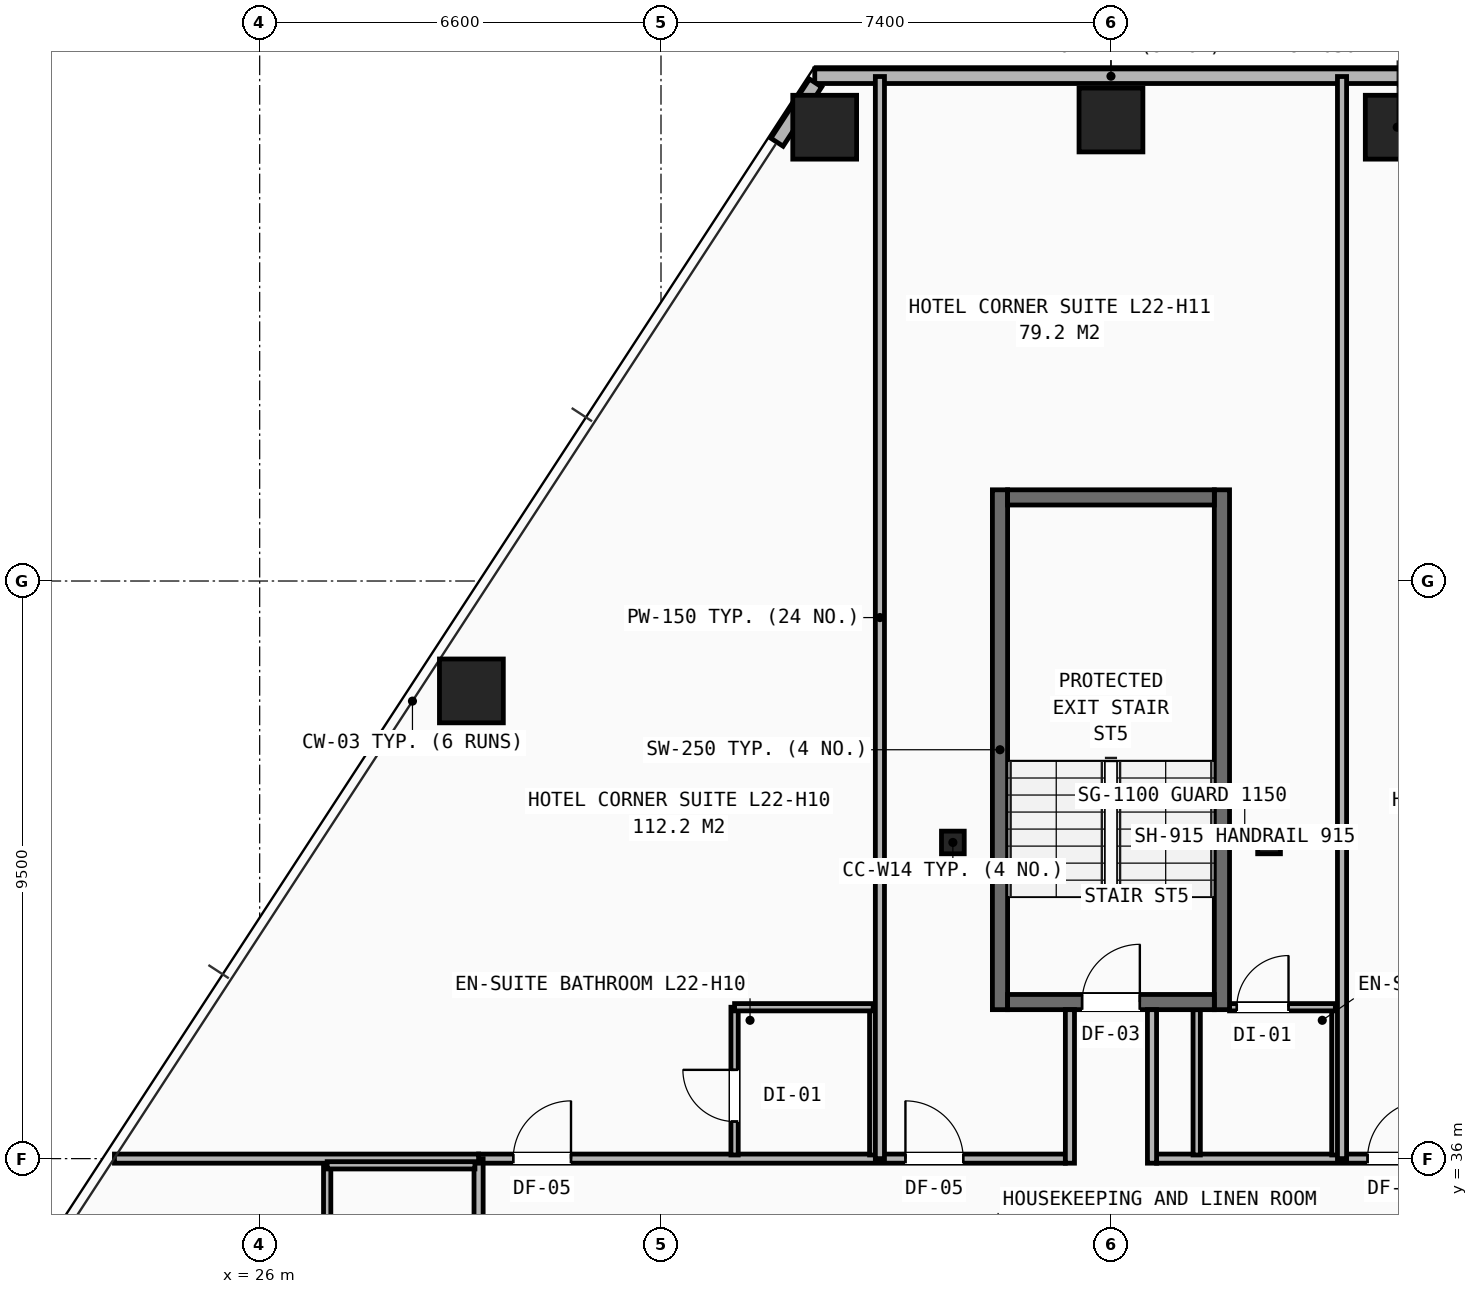
"""IFC4 building model, lengths in metres.
Left out: names, types, materials, properties, quantities, classifications, styles, units other than length and angle.
Written with IfcOpenShell. Run it as: python <this file> out.ifc"""

import sys

from ifc_helpers import new_model, si_unit, direction, frame, frame_2d, origin, origin_2d, place, context, subcontext, project, spatial, rectangle, hollow_rectangle, i_section, extrude, element, fill, save


model = new_model("IFC4")
c1 = context("Model", 3, precision=1e-05, world=origin(), true_north=direction((0.0, 1.0)))
c2 = subcontext(c1, "Body", "Model", "MODEL_VIEW")
j1 = project(units=[si_unit("LENGTHUNIT", "METRE"), si_unit("PLANEANGLEUNIT", "RADIAN")], contexts=[c1])
p1 = place(None, origin())
s1 = spatial("IfcSite", under=j1, at=p1, CompositionType="ELEMENT")
p2 = place(p1, origin())
s2 = spatial("IfcBuilding", under=s1, at=p2, CompositionType="ELEMENT")
p3 = place(p2, frame((0.0, 0.0, 79.8)))
s3 = spatial("IfcBuildingStorey", under=s2, at=p3, CompositionType="ELEMENT", Elevation=79.8)
for number, where, z_axis, x_axis in (
    (1, (37.4, 41.2, 0.0), (0.0, 0.0, 1.0), (1.0, 0.0, 0.0)),
    (2, (42.6, 41.2, 0.0), (0.0, 0.0, 1.0), (1.0, 0.0, 0.0)),
):
    element("IfcColumn", number, at=place(p3, frame(where, z_axis=z_axis, x_axis=x_axis)), inside=s3, PredefinedType="COLUMN", context=c2, shape_type="SweptSolid", body=[
        extrude(i_section(OverallWidth=0.374, OverallDepth=0.372, WebThickness=0.016, FlangeThickness=0.026, at=origin_2d()), origin(), (0.0, 0.0, 1.0), 3.2),
    ])
for number, where, z_axis, x_axis in (
    (3, (44.708, 52.964, 0.0), (0.0, 0.0, 1.0), (1.0, 0.0, 0.0)),
    (4, (40.0, 53.083, 0.0), (0.0, 0.0, 1.0), (1.0, 0.0, 0.0)),
    (5, (35.292, 52.964, 0.0), (0.0, 0.0, 1.0), (1.0, 0.0, 0.0)),
    (6, (29.482, 43.692, 0.0), (0.0, 0.0, 1.0), (1.0, 0.0, 0.0)),
):
    element("IfcColumn", number, at=place(p3, frame(where, z_axis=z_axis, x_axis=x_axis)), inside=s3, PredefinedType="COLUMN", context=c2, shape_type="SweptSolid", body=[
        extrude(hollow_rectangle(XDim=1.05, YDim=1.05, WallThickness=0.07, at=origin_2d()), origin(), (0.0, 0.0, 1.0), 3.2),
    ])
p4 = place(p3, frame((35.128, 53.802, 0.0), z_axis=(0.0, 0.0, 1.0), x_axis=(1.0, 0.0, 0.0)))
e7 = element("IfcWall", 7, at=p4, inside=s3, PredefinedType="SHEAR", context=c2, shape_type="SweptSolid", body=[
    extrude(rectangle(XDim=9.743, YDim=0.24, at=frame_2d((4.872, 0.0))), origin(), (0.0, 0.0, 1.0), 2.253),
])
p5 = place(p3, frame((35.142, 53.691, 0.0), z_axis=(0.0, 0.0, 1.0), x_axis=(-0.546287000619, -0.837598061695, 0.0)))
e8 = element("IfcWall", 8, at=p5, inside=s3, PredefinedType="SHEAR", context=c2, shape_type="SweptSolid", body=[
    extrude(rectangle(XDim=1.162, YDim=0.24, at=frame_2d((0.581, 0.0))), origin(), (0.0, 0.0, 1.0), 2.253),
])
p6 = place(p3, frame((29.6, 36.0, 0.0), z_axis=(0.0, 0.0, 1.0), x_axis=(1.0, 0.0, 0.0)))
e9 = element("IfcWall", 9, at=p6, inside=s3, PredefinedType="PARTITIONING", context=c2, shape_type="SweptSolid", body=[
    extrude(rectangle(XDim=9.65, YDim=0.15, at=frame_2d((4.825, 0.0))), origin(), (0.0, 0.0, 1.0), 2.97),
])
p7 = place(p6, frame((0.57, 0.0, 0.0)))
e10 = element("IfcOpeningElement", 10, at=p7, cuts=e9, PredefinedType="OPENING", context=c2, shape_type="SweptSolid", body=[
    extrude(rectangle(XDim=0.95, YDim=2.1, at=frame_2d((0.475, 1.05))), frame((0.0, 0.085, 0.0), z_axis=(0.0, -1.0, 0.0), x_axis=(1.0, 0.0, 0.0)), (0.0, 0.0, 1.0), 0.17),
])
p8 = place(p6, frame((7.02, 0.0, 0.0)))
e11 = element("IfcOpeningElement", 11, at=p8, cuts=e9, PredefinedType="OPENING", context=c2, shape_type="SweptSolid", body=[
    extrude(rectangle(XDim=0.95, YDim=2.1, at=frame_2d((0.475, 1.05))), frame((0.0, 0.085, 0.0), z_axis=(0.0, -1.0, 0.0), x_axis=(1.0, 0.0, 0.0)), (0.0, 0.0, 1.0), 0.17),
])
p9 = place(p3, frame((40.75, 36.0, 0.0), z_axis=(0.0, 0.0, 1.0), x_axis=(1.0, 0.0, 0.0)))
e12 = element("IfcWall", 12, at=p9, inside=s3, PredefinedType="PARTITIONING", context=c2, shape_type="SweptSolid", body=[
    extrude(rectangle(XDim=9.65, YDim=0.15, at=frame_2d((4.825, 0.0))), origin(), (0.0, 0.0, 1.0), 2.503),
])
p10 = place(p9, frame((3.47, 0.0, 0.0)))
e13 = element("IfcOpeningElement", 13, at=p10, cuts=e12, PredefinedType="OPENING", context=c2, shape_type="SweptSolid", body=[
    extrude(rectangle(XDim=0.95, YDim=2.1, at=frame_2d((0.475, 1.05))), frame((0.0, 0.085, 0.0), z_axis=(0.0, -1.0, 0.0), x_axis=(1.0, 0.0, 0.0)), (0.0, 0.0, 1.0), 0.17),
])
p11 = place(p3, frame((29.6, 14.1, 0.0), z_axis=(0.0, 0.0, 1.0), x_axis=(0.0, 1.0, 0.0)))
e14 = element("IfcWall", 14, at=p11, inside=s3, PredefinedType="PARTITIONING", context=c2, shape_type="SweptSolid", body=[
    extrude(rectangle(XDim=21.9, YDim=0.15, at=frame_2d((10.95, 0.0))), origin(), (0.0, 0.0, 1.0), 2.181),
])
p12 = place(p11, frame((0.42, 0.0, 0.0)))
e15 = element("IfcOpeningElement", 15, at=p12, cuts=e14, PredefinedType="OPENING", context=c2, shape_type="SweptSolid", body=[
    extrude(rectangle(XDim=0.95, YDim=2.1, at=frame_2d((0.475, 1.05))), frame((0.0, 0.085, 0.0), z_axis=(0.0, -1.0, 0.0), x_axis=(1.0, 0.0, 0.0)), (0.0, 0.0, 1.0), 0.17),
])
p13 = place(p11, frame((5.82, 0.0, 0.0)))
e16 = element("IfcOpeningElement", 16, at=p13, cuts=e14, PredefinedType="OPENING", context=c2, shape_type="SweptSolid", body=[
    extrude(rectangle(XDim=0.95, YDim=2.1, at=frame_2d((0.475, 1.05))), frame((0.0, 0.085, 0.0), z_axis=(0.0, -1.0, 0.0), x_axis=(1.0, 0.0, 0.0)), (0.0, 0.0, 1.0), 0.17),
])
p14 = place(p11, frame((11.32, 0.0, 0.0)))
e17 = element("IfcOpeningElement", 17, at=p14, cuts=e14, PredefinedType="OPENING", context=c2, shape_type="SweptSolid", body=[
    extrude(rectangle(XDim=0.95, YDim=2.1, at=frame_2d((0.475, 1.05))), frame((0.0, 0.085, 0.0), z_axis=(0.0, -1.0, 0.0), x_axis=(1.0, 0.0, 0.0)), (0.0, 0.0, 1.0), 0.17),
])
p15 = place(p11, frame((16.82, 0.0, 0.0)))
e18 = element("IfcOpeningElement", 18, at=p15, cuts=e14, PredefinedType="OPENING", context=c2, shape_type="SweptSolid", body=[
    extrude(rectangle(XDim=0.95, YDim=2.1, at=frame_2d((0.475, 1.05))), frame((0.0, 0.085, 0.0), z_axis=(0.0, -1.0, 0.0), x_axis=(1.0, 0.0, 0.0)), (0.0, 0.0, 1.0), 0.17),
])
p16 = place(p3, frame((23.611, 36.0, 0.0), z_axis=(0.0, 0.0, 1.0), x_axis=(1.0, 0.0, 0.0)))
e19 = element("IfcWall", 19, at=p16, inside=s3, PredefinedType="PARTITIONING", context=c2, shape_type="SweptSolid", body=[
    extrude(rectangle(XDim=5.989, YDim=0.15, at=frame_2d((2.994, 0.0))), origin(), (0.0, 0.0, 1.0), 2.258),
])
p17 = place(p3, frame((27.11, 33.61, 0.0), z_axis=(0.0, 0.0, 1.0), x_axis=(0.0, 1.0, 0.0)))
e20 = element("IfcWall", 20, at=p17, inside=s3, PredefinedType="PARTITIONING", context=c2, shape_type="SweptSolid", body=[
    extrude(rectangle(XDim=2.28, YDim=0.12, at=frame_2d((1.14, 0.0))), origin(), (0.0, 0.0, 1.0), 2.503),
])
p18 = place(p3, frame((27.11, 35.89, 0.0), z_axis=(0.0, 0.0, 1.0), x_axis=(1.0, 0.0, 0.0)))
e21 = element("IfcWall", 21, at=p18, inside=s3, PredefinedType="PARTITIONING", context=c2, shape_type="SweptSolid", body=[
    extrude(rectangle(XDim=2.43, YDim=0.12, at=frame_2d((1.215, 0.0))), origin(), (0.0, 0.0, 1.0), 2.503),
])
p19 = place(p3, frame((33.81, 36.06, 0.0), z_axis=(0.0, 0.0, 1.0), x_axis=(0.0, 1.0, 0.0)))
e22 = element("IfcWall", 22, at=p19, inside=s3, PredefinedType="PARTITIONING", context=c2, shape_type="SweptSolid", body=[
    extrude(rectangle(XDim=2.43, YDim=0.12, at=frame_2d((1.215, 0.0))), origin(), (0.0, 0.0, 1.0), 2.97),
])
p20 = place(p19, frame((0.55, 0.0, 0.0)))
e23 = element("IfcOpeningElement", 23, at=p20, cuts=e22, PredefinedType="OPENING", context=c2, shape_type="SweptSolid", body=[
    extrude(rectangle(XDim=0.85, YDim=2.05, at=frame_2d((0.425, 1.025))), frame((0.0, 0.07, 0.0), z_axis=(0.0, -1.0, 0.0), x_axis=(1.0, 0.0, 0.0)), (0.0, 0.0, 1.0), 0.14),
])
p21 = place(p3, frame((36.09, 36.06, 0.0), z_axis=(0.0, 0.0, 1.0), x_axis=(0.0, 1.0, 0.0)))
e24 = element("IfcWall", 24, at=p21, inside=s3, PredefinedType="PARTITIONING", context=c2, shape_type="SweptSolid", body=[
    extrude(rectangle(XDim=2.43, YDim=0.12, at=frame_2d((1.215, 0.0))), origin(), (0.0, 0.0, 1.0), 2.97),
])
p22 = place(p3, frame((33.81, 38.49, 0.0), z_axis=(0.0, 0.0, 1.0), x_axis=(1.0, 0.0, 0.0)))
e25 = element("IfcWall", 25, at=p22, inside=s3, PredefinedType="PARTITIONING", context=c2, shape_type="SweptSolid", body=[
    extrude(rectangle(XDim=2.28, YDim=0.12, at=frame_2d((1.14, 0.0))), origin(), (0.0, 0.0, 1.0), 2.97),
])
p23 = place(p3, frame((36.2, 36.0, 0.0), z_axis=(0.0, 0.0, 1.0), x_axis=(0.0, 1.0, 0.0)))
e26 = element("IfcWall", 26, at=p23, inside=s3, PredefinedType="PARTITIONING", context=c2, shape_type="SweptSolid", body=[
    extrude(rectangle(XDim=17.797, YDim=0.15, at=frame_2d((8.899, 0.0))), origin(), (0.0, 0.0, 1.0), 2.181),
])
p24 = place(p3, frame((41.41, 36.06, 0.0), z_axis=(0.0, 0.0, 1.0), x_axis=(0.0, 1.0, 0.0)))
e27 = element("IfcWall", 27, at=p24, inside=s3, PredefinedType="PARTITIONING", context=c2, shape_type="SweptSolid", body=[
    extrude(rectangle(XDim=2.39, YDim=0.12, at=frame_2d((1.195, 0.0))), origin(), (0.0, 0.0, 1.0), 2.97),
])
p25 = place(p3, frame((43.69, 36.06, 0.0), z_axis=(0.0, 0.0, 1.0), x_axis=(0.0, 1.0, 0.0)))
e28 = element("IfcWall", 28, at=p25, inside=s3, PredefinedType="PARTITIONING", context=c2, shape_type="SweptSolid", body=[
    extrude(rectangle(XDim=2.43, YDim=0.12, at=frame_2d((1.215, 0.0))), origin(), (0.0, 0.0, 1.0), 2.97),
])
p26 = place(p3, frame((41.95, 38.49, 0.0), z_axis=(0.0, 0.0, 1.0), x_axis=(1.0, 0.0, 0.0)))
e29 = element("IfcWall", 29, at=p26, inside=s3, PredefinedType="PARTITIONING", context=c2, shape_type="SweptSolid", body=[
    extrude(rectangle(XDim=1.74, YDim=0.12, at=frame_2d((0.87, 0.0))), origin(), (0.0, 0.0, 1.0), 2.97),
])
p27 = place(p26, frame((0.12, 0.0, 0.0)))
e30 = element("IfcOpeningElement", 30, at=p27, cuts=e29, PredefinedType="OPENING", context=c2, shape_type="SweptSolid", body=[
    extrude(rectangle(XDim=0.85, YDim=2.05, at=frame_2d((0.425, 1.025))), frame((0.0, 0.07, 0.0), z_axis=(0.0, -1.0, 0.0), x_axis=(1.0, 0.0, 0.0)), (0.0, 0.0, 1.0), 0.14),
])
p28 = place(p3, frame((43.8, 36.0, 0.0), z_axis=(0.0, 0.0, 1.0), x_axis=(0.0, 1.0, 0.0)))
e31 = element("IfcWall", 31, at=p28, inside=s3, PredefinedType="PARTITIONING", context=c2, shape_type="SweptSolid", body=[
    extrude(rectangle(XDim=17.797, YDim=0.15, at=frame_2d((8.899, 0.0))), origin(), (0.0, 0.0, 1.0), 2.181),
])
for number, where, z_axis, x_axis in (
    (32, (38.175, 38.45, 0.0), (0.0, 0.0, 1.0), (0.0, 1.0, 0.0)),
    (33, (41.825, 38.45, 0.0), (0.0, 0.0, 1.0), (0.0, 1.0, 0.0)),
):
    element("IfcWall", number, at=place(p3, frame(where, z_axis=z_axis, x_axis=x_axis)), inside=s3, PredefinedType="SHEAR", context=c2, shape_type="SweptSolid", body=[
        extrude(rectangle(XDim=8.55, YDim=0.25, at=frame_2d((4.275, 0.0))), origin(), (0.0, 0.0, 1.0), 2.97),
    ])
p29 = place(p3, frame((38.3, 38.575, 0.0), z_axis=(0.0, 0.0, 1.0), x_axis=(1.0, 0.0, 0.0)))
e34 = element("IfcWall", 34, at=p29, inside=s3, PredefinedType="SHEAR", context=c2, shape_type="SweptSolid", body=[
    extrude(rectangle(XDim=3.4, YDim=0.25, at=frame_2d((1.7, 0.0))), origin(), (0.0, 0.0, 1.0), 2.97),
])
p30 = place(p29, frame((1.225, 0.0, 0.0)))
e35 = element("IfcOpeningElement", 35, at=p30, cuts=e34, PredefinedType="OPENING", context=c2, shape_type="SweptSolid", body=[
    extrude(rectangle(XDim=0.95, YDim=2.1, at=frame_2d((0.475, 1.05))), frame((0.0, 0.135, 0.0), z_axis=(0.0, -1.0, 0.0), x_axis=(1.0, 0.0, 0.0)), (0.0, 0.0, 1.0), 0.27),
])
p31 = place(p3, frame((38.3, 46.875, 0.0), z_axis=(0.0, 0.0, 1.0), x_axis=(1.0, 0.0, 0.0)))
e36 = element("IfcWall", 36, at=p31, inside=s3, PredefinedType="SHEAR", context=c2, shape_type="SweptSolid", body=[
    extrude(rectangle(XDim=3.4, YDim=0.25, at=frame_2d((1.7, 0.0))), origin(), (0.0, 0.0, 1.0), 2.97),
])
for number, where, z_axis, x_axis in (
    (37, (39.325, 35.925, 0.0), (0.0, 0.0, 1.0), (0.0, 1.0, 0.0)),
    (38, (40.675, 35.925, 0.0), (0.0, 0.0, 1.0), (0.0, 1.0, 0.0)),
):
    element("IfcWall", number, at=place(p3, frame(where, z_axis=z_axis, x_axis=x_axis)), inside=s3, PredefinedType="PARTITIONING", context=c2, shape_type="SweptSolid", body=[
        extrude(rectangle(XDim=2.525, YDim=0.15, at=frame_2d((1.262, 0.0))), origin(), (0.0, 0.0, 1.0), 2.97),
    ])
p32 = place(p7, origin())
e39 = element("IfcDoor", 39, at=p32, inside=s3, OperationType="SINGLE_SWING_RIGHT", PredefinedType="DOOR", context=c2, shape_type="SweptSolid", body=[
    extrude(rectangle(XDim=0.95, YDim=2.1, at=frame_2d((0.475, 1.05))), frame((0.0, 0.025, 0.0), z_axis=(0.0, -1.0, 0.0), x_axis=(1.0, 0.0, 0.0)), (0.0, 0.0, 1.0), 0.05),
])
fill(e10, e39)
p33 = place(p20, origin())
e40 = element("IfcDoor", 40, at=p33, inside=s3, OperationType="SINGLE_SWING_RIGHT", PredefinedType="DOOR", context=c2, shape_type="SweptSolid", body=[
    extrude(rectangle(XDim=0.85, YDim=2.05, at=frame_2d((0.425, 1.025))), frame((0.0, 0.025, 0.0), z_axis=(0.0, -1.0, 0.0), x_axis=(1.0, 0.0, 0.0)), (0.0, 0.0, 1.0), 0.05),
])
fill(e23, e40)
p34 = place(p8, origin())
e41 = element("IfcDoor", 41, at=p34, inside=s3, OperationType="SINGLE_SWING_LEFT", PredefinedType="DOOR", context=c2, shape_type="SweptSolid", body=[
    extrude(rectangle(XDim=0.95, YDim=2.1, at=frame_2d((0.475, 1.05))), frame((0.0, 0.025, 0.0), z_axis=(0.0, -1.0, 0.0), x_axis=(1.0, 0.0, 0.0)), (0.0, 0.0, 1.0), 0.05),
])
fill(e11, e41)
p35 = place(p27, origin())
e42 = element("IfcDoor", 42, at=p35, inside=s3, OperationType="SINGLE_SWING_RIGHT", PredefinedType="DOOR", context=c2, shape_type="SweptSolid", body=[
    extrude(rectangle(XDim=0.85, YDim=2.05, at=frame_2d((0.425, 1.025))), frame((0.0, 0.025, 0.0), z_axis=(0.0, -1.0, 0.0), x_axis=(1.0, 0.0, 0.0)), (0.0, 0.0, 1.0), 0.05),
])
fill(e30, e42)
p36 = place(p10, origin())
e43 = element("IfcDoor", 43, at=p36, inside=s3, OperationType="SINGLE_SWING_RIGHT", PredefinedType="DOOR", context=c2, shape_type="SweptSolid", body=[
    extrude(rectangle(XDim=0.95, YDim=2.1, at=frame_2d((0.475, 1.05))), frame((0.0, 0.025, 0.0), z_axis=(0.0, -1.0, 0.0), x_axis=(1.0, 0.0, 0.0)), (0.0, 0.0, 1.0), 0.05),
])
fill(e13, e43)
p37 = place(p30, origin())
e44 = element("IfcDoor", 44, at=p37, inside=s3, OperationType="SINGLE_SWING_RIGHT", PredefinedType="DOOR", context=c2, shape_type="SweptSolid", body=[
    extrude(rectangle(XDim=0.95, YDim=2.1, at=frame_2d((0.475, 1.05))), frame((0.0, 0.025, 0.0), z_axis=(0.0, -1.0, 0.0), x_axis=(1.0, 0.0, 0.0)), (0.0, 0.0, 1.0), 0.05),
])
fill(e35, e44)
save(model, sys.argv[1])
